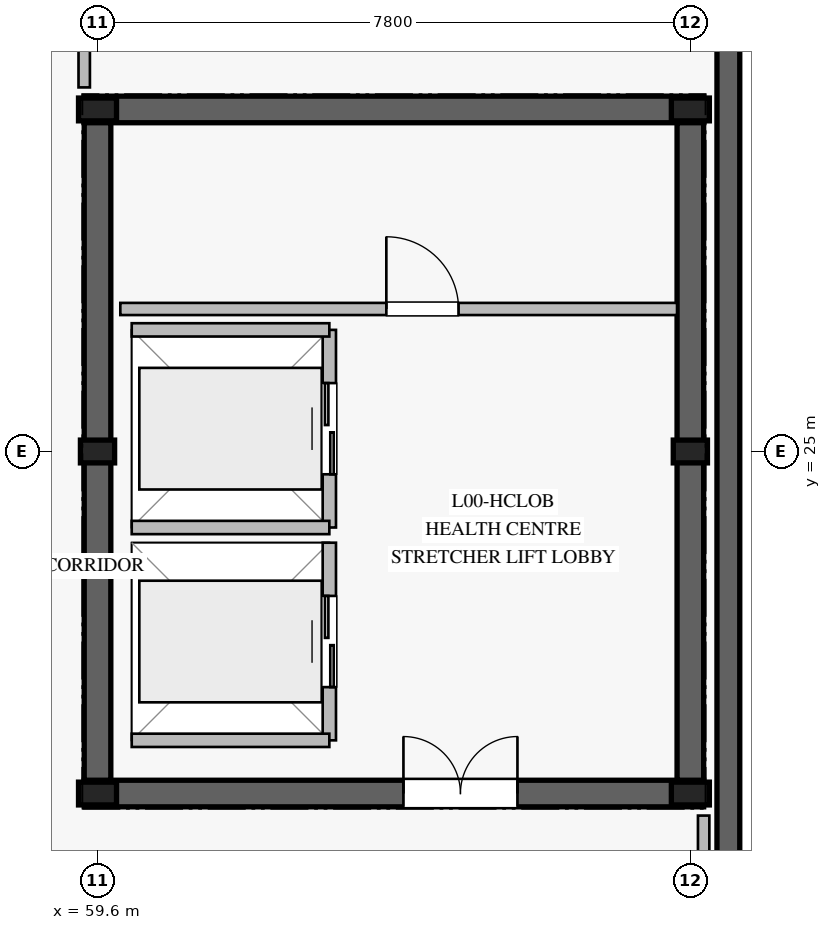
"""IFC4 building model, lengths in metres.
Left out: names, types, materials, properties, quantities, classifications, styles, units other than length and angle.
Written with IfcOpenShell. Run it as: python <this file> out.ifc"""

import sys

from ifc_helpers import new_model, si_unit, direction, frame, frame_2d, origin, origin_2d, place, context, subcontext, project, spatial, rectangle, i_section, extrude, element, fill, save


model = new_model("IFC4")
c1 = context("Model", 3, precision=1e-05, world=origin(), true_north=direction((0.0, 1.0)))
c2 = subcontext(c1, "Body", "Model", "MODEL_VIEW")
j1 = project(units=[si_unit("LENGTHUNIT", "METRE"), si_unit("PLANEANGLEUNIT", "RADIAN")], contexts=[c1])
p1 = place(None, origin())
s1 = spatial("IfcSite", under=j1, at=p1, CompositionType="ELEMENT")
p2 = place(p1, origin())
s2 = spatial("IfcBuilding", under=s1, at=p2, CompositionType="ELEMENT")
p3 = place(p2, origin())
s3 = spatial("IfcBuildingStorey", under=s2, at=p3, CompositionType="ELEMENT", Elevation=0.0)
p4 = place(p3, frame((67.9, 10.5, 0.0), z_axis=(0.0, 0.0, 1.0), x_axis=(0.0, 1.0, 0.0)))
e1 = element("IfcWall", 1, at=p4, inside=s3, PredefinedType="SOLIDWALL", context=c2, shape_type="SweptSolid", body=[
    extrude(rectangle(XDim=28.5, YDim=0.3, at=frame_2d((14.25, 0.0))), origin(), (0.0, 0.0, 1.0), 4.94),
])
p5 = place(p3, frame((59.425, 20.5, 0.0), z_axis=(0.0, 0.0, 1.0), x_axis=(1.0, 0.0, 0.0)))
e2 = element("IfcWall", 2, at=p5, inside=s3, PredefinedType="SHEAR", context=c2, shape_type="SweptSolid", body=[
    extrude(rectangle(XDim=8.15, YDim=0.35, at=frame_2d((4.075, 0.0))), origin(), (0.0, 0.0, 1.0), 4.94),
])
p6 = place(p5, frame((4.2, 0.0, 0.0)))
e3 = element("IfcOpeningElement", 3, at=p6, cuts=e2, PredefinedType="OPENING", context=c2, shape_type="SweptSolid", body=[
    extrude(rectangle(XDim=1.5, YDim=2.2, at=frame_2d((0.75, 1.1))), frame((0.0, 0.185, 0.0), z_axis=(0.0, -1.0, 0.0), x_axis=(1.0, 0.0, 0.0)), (0.0, 0.0, 1.0), 0.37),
])
p7 = place(p3, frame((67.575, 29.5, 0.0), z_axis=(0.0, 0.0, 1.0), x_axis=(-1.0, 0.0, 0.0)))
e4 = element("IfcWall", 4, at=p7, inside=s3, PredefinedType="SHEAR", context=c2, shape_type="SweptSolid", body=[
    extrude(rectangle(XDim=8.15, YDim=0.35, at=frame_2d((4.075, 0.0))), origin(), (0.0, 0.0, 1.0), 4.94),
])
for number, where, z_axis, x_axis in (
    (5, (59.6, 29.325, 0.0), (0.0, 0.0, 1.0), (0.0, -1.0, 0.0)),
    (6, (67.4, 20.675, 0.0), (0.0, 0.0, 1.0), (0.0, 1.0, 0.0)),
):
    element("IfcWall", number, at=place(p3, frame(where, z_axis=z_axis, x_axis=x_axis)), inside=s3, PredefinedType="SHEAR", context=c2, shape_type="SweptSolid", body=[
        extrude(rectangle(XDim=8.65, YDim=0.35, at=frame_2d((4.325, 0.0))), origin(), (0.0, 0.0, 1.0), 4.94),
    ])
for number, where, z_axis, x_axis in (
    (7, (59.6, 20.5, 0.0), (0.0, 0.0, 1.0), (1.0, 0.0, 0.0)),
    (8, (67.4, 20.5, 0.0), (0.0, 0.0, 1.0), (1.0, 0.0, 0.0)),
    (9, (67.4, 29.5, 0.0), (0.0, 0.0, 1.0), (1.0, 0.0, 0.0)),
    (10, (59.6, 29.5, 0.0), (0.0, 0.0, 1.0), (1.0, 0.0, 0.0)),
):
    element("IfcColumn", number, at=place(p3, frame(where, z_axis=z_axis, x_axis=x_axis)), inside=s3, PredefinedType="COLUMN", context=c2, shape_type="SweptSolid", body=[
        extrude(i_section(OverallWidth=0.3, OverallDepth=0.5, WebThickness=0.014, FlangeThickness=0.028, at=origin_2d()), origin(), (0.0, 0.0, 1.0), 5.2),
    ])
for number, where, z_axis, x_axis in (
    (11, (59.6, 25.0, 0.0), (0.0, 0.0, 1.0), (1.0, 0.0, 0.0)),
    (12, (67.4, 25.0, 0.0), (0.0, 0.0, 1.0), (1.0, 0.0, 0.0)),
):
    element("IfcColumn", number, at=place(p3, frame(where, z_axis=z_axis, x_axis=x_axis)), inside=s3, PredefinedType="COLUMN", context=c2, shape_type="SweptSolid", body=[
        extrude(i_section(OverallWidth=0.3, OverallDepth=0.45, WebThickness=0.014, FlangeThickness=0.026, at=origin_2d()), origin(), (0.0, 0.0, 1.0), 5.2),
    ])
p8 = place(p3, frame((62.65, 21.2, 0.0), z_axis=(0.0, 0.0, 1.0), x_axis=(0.0, 1.0, 0.0)))
e13 = element("IfcWall", 13, at=p8, inside=s3, PredefinedType="PARTITIONING", context=c2, shape_type="SweptSolid", body=[
    extrude(rectangle(XDim=2.6, YDim=0.175, at=frame_2d((1.3, 0.0))), origin(), (0.0, 0.0, 1.0), 4.94),
])
p9 = place(p8, frame((0.7, 0.0, 0.0)))
e14 = element("IfcOpeningElement", 14, at=p9, cuts=e13, PredefinedType="OPENING", context=c2, shape_type="SweptSolid", body=[
    extrude(rectangle(XDim=1.2, YDim=2.2, at=frame_2d((0.6, 1.1))), frame((0.0, 0.098, 0.0), z_axis=(0.0, -1.0, 0.0), x_axis=(1.0, 0.0, 0.0)), (0.0, 0.0, 1.0), 0.195),
])
p10 = place(p3, frame((60.05, 21.2, 0.0), z_axis=(0.0, 0.0, 1.0), x_axis=(1.0, 0.0, 0.0)))
e15 = element("IfcWall", 15, at=p10, inside=s3, PredefinedType="PARTITIONING", context=c2, shape_type="SweptSolid", body=[
    extrude(rectangle(XDim=2.6, YDim=0.175, at=frame_2d((1.3, 0.0))), origin(), (0.0, 0.0, 1.0), 4.94),
])
p11 = place(p3, frame((62.65, 24.0, 0.0), z_axis=(0.0, 0.0, 1.0), x_axis=(0.0, 1.0, 0.0)))
e16 = element("IfcWall", 16, at=p11, inside=s3, PredefinedType="PARTITIONING", context=c2, shape_type="SweptSolid", body=[
    extrude(rectangle(XDim=2.6, YDim=0.175, at=frame_2d((1.3, 0.0))), origin(), (0.0, 0.0, 1.0), 4.58),
])
p12 = place(p11, frame((0.7, 0.0, 0.0)))
e17 = element("IfcOpeningElement", 17, at=p12, cuts=e16, PredefinedType="OPENING", context=c2, shape_type="SweptSolid", body=[
    extrude(rectangle(XDim=1.2, YDim=2.2, at=frame_2d((0.6, 1.1))), frame((0.0, 0.098, 0.0), z_axis=(0.0, -1.0, 0.0), x_axis=(1.0, 0.0, 0.0)), (0.0, 0.0, 1.0), 0.195),
])
for number, where, z_axis, x_axis in (
    (18, (60.05, 24.0, 0.0), (0.0, 0.0, 1.0), (1.0, 0.0, 0.0)),
    (19, (60.05, 26.6, 0.0), (0.0, 0.0, 1.0), (1.0, 0.0, 0.0)),
):
    element("IfcWall", number, at=place(p3, frame(where, z_axis=z_axis, x_axis=x_axis)), inside=s3, PredefinedType="PARTITIONING", context=c2, shape_type="SweptSolid", body=[
        extrude(rectangle(XDim=2.6, YDim=0.175, at=frame_2d((1.3, 0.0))), origin(), (0.0, 0.0, 1.0), 4.94),
    ])
p13 = place(p3, frame((59.9, 26.875, 0.0), z_axis=(0.0, 0.0, 1.0), x_axis=(1.0, 0.0, 0.0)))
e20 = element("IfcWall", 20, at=p13, inside=s3, PredefinedType="PLUMBINGWALL", context=c2, shape_type="SweptSolid", body=[
    extrude(rectangle(XDim=7.325, YDim=0.16, at=frame_2d((3.663, 0.0))), origin(), (0.0, 0.0, 1.0), 4.58),
])
p14 = place(p13, frame((3.5, 0.0, 0.0)))
e21 = element("IfcOpeningElement", 21, at=p14, cuts=e20, PredefinedType="OPENING", context=c2, shape_type="SweptSolid", body=[
    extrude(rectangle(XDim=0.95, YDim=2.1, at=frame_2d((0.475, 1.05))), frame((0.0, 0.09, 0.0), z_axis=(0.0, -1.0, 0.0), x_axis=(1.0, 0.0, 0.0)), (0.0, 0.0, 1.0), 0.18),
])
for number, where, z_axis, x_axis in (
    (22, (59.425, 29.79, 0.0), (0.0, 0.0, 1.0), (0.0, 1.0, 0.0)),
    (23, (67.575, 19.265, 0.0), (0.0, 0.0, 1.0), (0.0, 1.0, 0.0)),
):
    element("IfcWall", number, at=place(p3, frame(where, z_axis=z_axis, x_axis=x_axis)), inside=s3, PredefinedType="PARTITIONING", context=c2, shape_type="SweptSolid", body=[
        extrude(rectangle(XDim=0.945, YDim=0.15, at=frame_2d((0.473, 0.0))), origin(), (0.0, 0.0, 1.0), 4.58),
    ])
p15 = place(p9, origin())
e24 = element("IfcDoor", 24, at=p15, inside=s3, OperationType="DOUBLE_DOOR_SLIDING", PredefinedType="DOOR", context=c2, shape_type="SweptSolid", body=[
    extrude(rectangle(XDim=1.2, YDim=2.2, at=frame_2d((0.6, 1.1))), frame((0.0, 0.025, 0.0), z_axis=(0.0, -1.0, 0.0), x_axis=(1.0, 0.0, 0.0)), (0.0, 0.0, 1.0), 0.05),
])
fill(e14, e24)
p16 = place(p12, origin())
e25 = element("IfcDoor", 25, at=p16, inside=s3, OperationType="DOUBLE_DOOR_SLIDING", PredefinedType="DOOR", context=c2, shape_type="SweptSolid", body=[
    extrude(rectangle(XDim=1.2, YDim=2.2, at=frame_2d((0.6, 1.1))), frame((0.0, 0.025, 0.0), z_axis=(0.0, -1.0, 0.0), x_axis=(1.0, 0.0, 0.0)), (0.0, 0.0, 1.0), 0.05),
])
fill(e17, e25)
p17 = place(p6, origin())
e26 = element("IfcDoor", 26, at=p17, inside=s3, OperationType="DOUBLE_DOOR_SINGLE_SWING", PredefinedType="DOOR", context=c2, shape_type="SweptSolid", body=[
    extrude(rectangle(XDim=1.5, YDim=2.2, at=frame_2d((0.75, 1.1))), frame((0.0, 0.025, 0.0), z_axis=(0.0, -1.0, 0.0), x_axis=(1.0, 0.0, 0.0)), (0.0, 0.0, 1.0), 0.05),
])
fill(e3, e26)
p18 = place(p14, origin())
e27 = element("IfcDoor", 27, at=p18, inside=s3, OperationType="SINGLE_SWING_LEFT", PredefinedType="DOOR", context=c2, shape_type="SweptSolid", body=[
    extrude(rectangle(XDim=0.95, YDim=2.1, at=frame_2d((0.475, 1.05))), frame((0.0, 0.025, 0.0), z_axis=(0.0, -1.0, 0.0), x_axis=(1.0, 0.0, 0.0)), (0.0, 0.0, 1.0), 0.05),
])
fill(e21, e27)
save(model, sys.argv[1])
